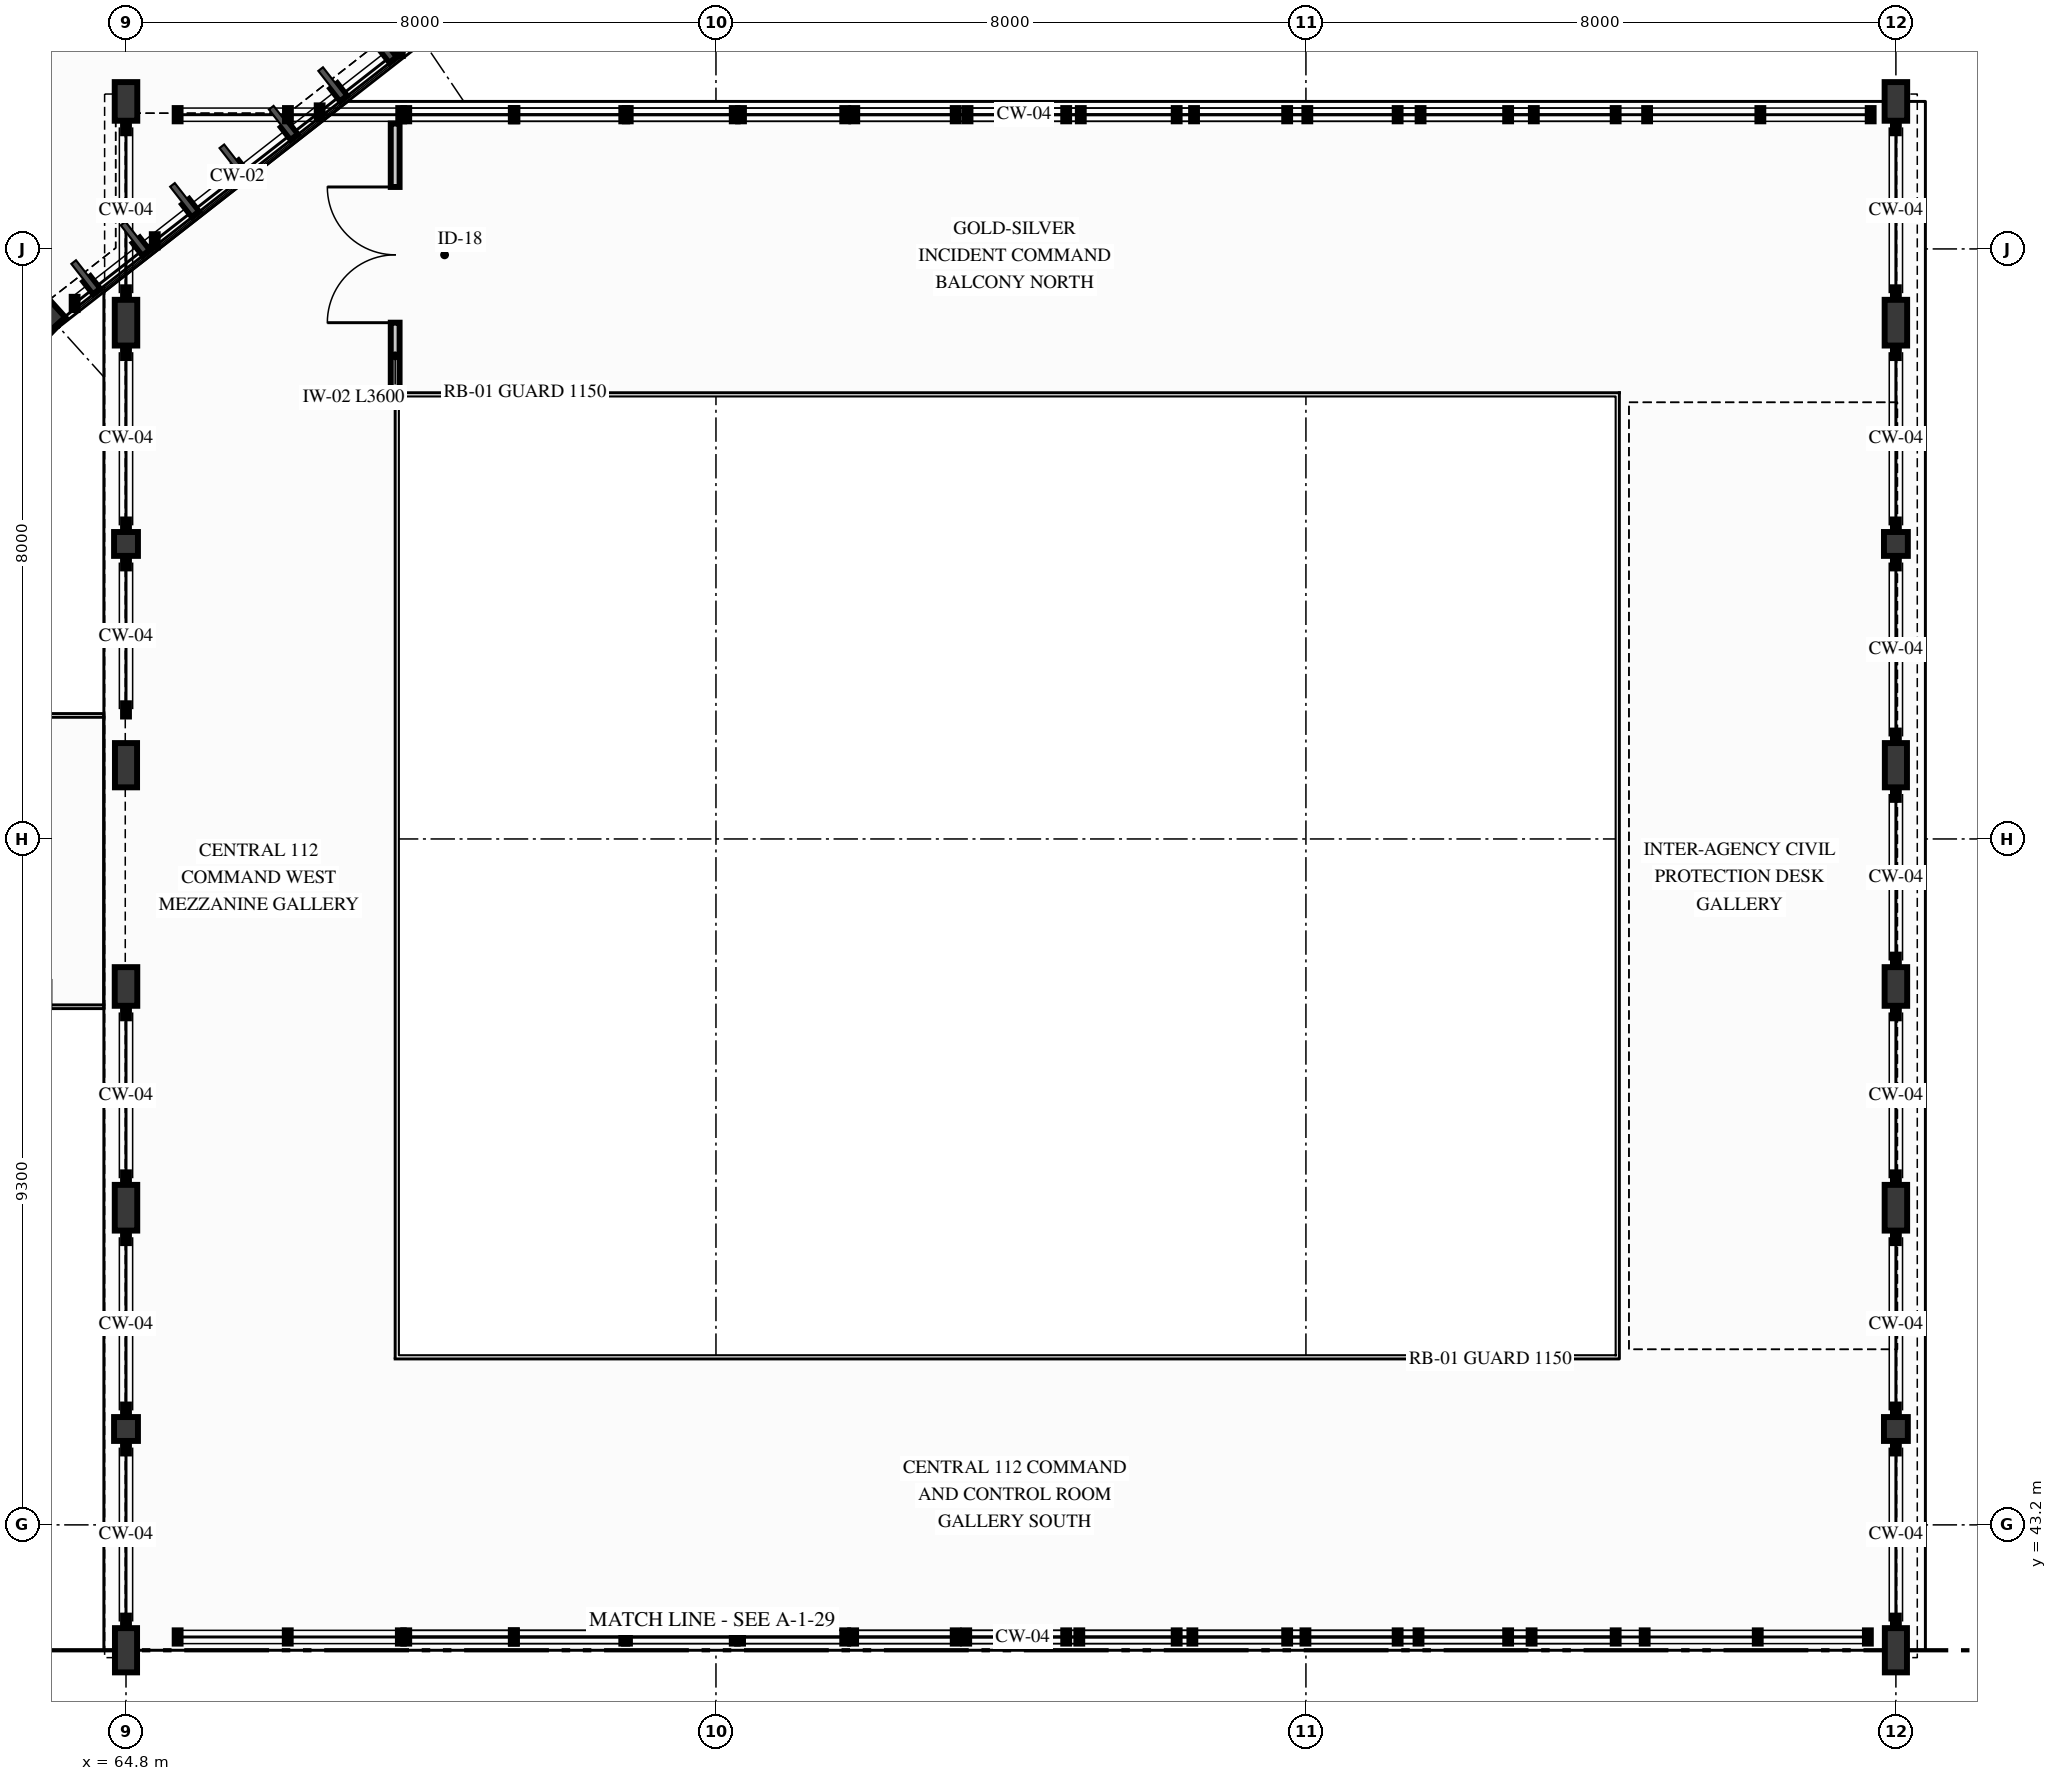
"""IFC4 building model, lengths in metres.
Left out: names, types, materials, properties, quantities, classifications, styles, units other than length and angle.
Written with IfcOpenShell. Run it as: python <this file> out.ifc"""

import sys

from ifc_helpers import new_model, si_unit, direction, frame, frame_2d, origin, origin_2d, place, context, subcontext, project, spatial, rectangle, hollow_circle, i_section, extrude, element, fill, save


model = new_model("IFC4")
c1 = context("Model", 3, precision=1e-05, world=origin(), true_north=direction((0.0, 1.0)))
c2 = subcontext(c1, "Body", "Model", "MODEL_VIEW")
j1 = project(units=[si_unit("LENGTHUNIT", "METRE"), si_unit("PLANEANGLEUNIT", "RADIAN")], contexts=[c1])
p1 = place(None, origin())
s1 = spatial("IfcSite", under=j1, at=p1, CompositionType="ELEMENT")
p2 = place(p1, origin())
s2 = spatial("IfcBuilding", under=s1, at=p2, CompositionType="ELEMENT")
p3 = place(p2, frame((0.0, 0.0, 5.1)))
s3 = spatial("IfcBuildingStorey", under=s2, at=p3, CompositionType="ELEMENT", Elevation=5.1)
p4 = place(p3, frame((63.655, 59.702, 0.0), z_axis=(0.0, 0.0, 1.0), x_axis=(0.743144825477, 0.669130606359, 0.0)))
e1 = element("IfcColumn", 1, at=p4, inside=s3, PredefinedType="COLUMN", context=c2, shape_type="SweptSolid", body=[
    extrude(i_section(OverallWidth=0.305, OverallDepth=0.62, WebThickness=0.021, FlangeThickness=0.04, FilletRadius=0.027, at=origin_2d()), origin(), (0.0, 0.0, 1.0), 4.2),
])
p5 = place(p3, frame((88.8, 41.5, 0.0), z_axis=(0.0, 0.0, 1.0), x_axis=(1.0, 0.0, 0.0)))
e2 = element("IfcColumn", 2, at=p5, inside=s3, PredefinedType="COLUMN", context=c2, shape_type="SweptSolid", body=[
    extrude(i_section(OverallWidth=0.3, OverallDepth=0.6, WebThickness=0.015, FlangeThickness=0.03, FilletRadius=0.027, at=origin_2d()), origin(), (0.0, 0.0, 1.0), 3.92),
])
p6 = place(p3, frame((88.8, 44.5, 0.0), z_axis=(0.0, 0.0, 1.0), x_axis=(1.0, 0.0, 0.0)))
e3 = element("IfcColumn", 3, at=p6, inside=s3, PredefinedType="COLUMN", context=c2, shape_type="SweptSolid", body=[
    extrude(hollow_circle(Radius=0.162, WallThickness=0.016, at=origin_2d()), origin(), (0.0, 0.0, 1.0), 3.92),
])
p7 = place(p3, frame((88.8, 47.5, 0.0), z_axis=(0.0, 0.0, 1.0), x_axis=(1.0, 0.0, 0.0)))
e4 = element("IfcColumn", 4, at=p7, inside=s3, PredefinedType="COLUMN", context=c2, shape_type="SweptSolid", body=[
    extrude(i_section(OverallWidth=0.305, OverallDepth=0.62, WebThickness=0.021, FlangeThickness=0.04, FilletRadius=0.027, at=origin_2d()), origin(), (0.0, 0.0, 1.0), 3.92),
])
p8 = place(p3, frame((88.8, 50.5, 0.0), z_axis=(0.0, 0.0, 1.0), x_axis=(1.0, 0.0, 0.0)))
e5 = element("IfcColumn", 5, at=p8, inside=s3, PredefinedType="COLUMN", context=c2, shape_type="SweptSolid", body=[
    extrude(i_section(OverallWidth=0.306, OverallDepth=0.524, WebThickness=0.021, FlangeThickness=0.04, FilletRadius=0.027, at=origin_2d()), origin(), (0.0, 0.0, 1.0), 3.92),
])
p9 = place(p3, frame((88.8, 53.5, 0.0), z_axis=(0.0, 0.0, 1.0), x_axis=(1.0, 0.0, 0.0)))
e6 = element("IfcColumn", 6, at=p9, inside=s3, PredefinedType="COLUMN", context=c2, shape_type="SweptSolid", body=[
    extrude(i_section(OverallWidth=0.3, OverallDepth=0.6, WebThickness=0.015, FlangeThickness=0.03, FilletRadius=0.027, at=origin_2d()), origin(), (0.0, 0.0, 1.0), 3.92),
])
p10 = place(p3, frame((88.8, 56.5, 0.0), z_axis=(0.0, 0.0, 1.0), x_axis=(1.0, 0.0, 0.0)))
e7 = element("IfcColumn", 7, at=p10, inside=s3, PredefinedType="COLUMN", context=c2, shape_type="SweptSolid", body=[
    extrude(hollow_circle(Radius=0.162, WallThickness=0.016, at=origin_2d()), origin(), (0.0, 0.0, 1.0), 3.92),
])
p11 = place(p3, frame((88.8, 59.5, 0.0), z_axis=(0.0, 0.0, 1.0), x_axis=(1.0, 0.0, 0.0)))
e8 = element("IfcColumn", 8, at=p11, inside=s3, PredefinedType="COLUMN", context=c2, shape_type="SweptSolid", body=[
    extrude(i_section(OverallWidth=0.305, OverallDepth=0.62, WebThickness=0.021, FlangeThickness=0.04, FilletRadius=0.027, at=origin_2d()), origin(), (0.0, 0.0, 1.0), 3.92),
])
p12 = place(p3, frame((88.8, 62.5, 0.0), z_axis=(0.0, 0.0, 1.0), x_axis=(1.0, 0.0, 0.0)))
e9 = element("IfcColumn", 9, at=p12, inside=s3, PredefinedType="COLUMN", context=c2, shape_type="SweptSolid", body=[
    extrude(i_section(OverallWidth=0.306, OverallDepth=0.524, WebThickness=0.021, FlangeThickness=0.04, FilletRadius=0.027, at=origin_2d()), origin(), (0.0, 0.0, 1.0), 3.92),
])
p13 = place(p3, frame((64.8, 41.5, 0.0), z_axis=(0.0, 0.0, 1.0), x_axis=(1.0, 0.0, 0.0)))
e10 = element("IfcColumn", 10, at=p13, inside=s3, PredefinedType="COLUMN", context=c2, shape_type="SweptSolid", body=[
    extrude(i_section(OverallWidth=0.3, OverallDepth=0.6, WebThickness=0.015, FlangeThickness=0.03, FilletRadius=0.027, at=origin_2d()), origin(), (0.0, 0.0, 1.0), 3.92),
])
p14 = place(p3, frame((64.8, 44.5, 0.0), z_axis=(0.0, 0.0, 1.0), x_axis=(1.0, 0.0, 0.0)))
e11 = element("IfcColumn", 11, at=p14, inside=s3, PredefinedType="COLUMN", context=c2, shape_type="SweptSolid", body=[
    extrude(hollow_circle(Radius=0.162, WallThickness=0.016, at=origin_2d()), origin(), (0.0, 0.0, 1.0), 3.92),
])
p15 = place(p3, frame((64.8, 47.5, 0.0), z_axis=(0.0, 0.0, 1.0), x_axis=(1.0, 0.0, 0.0)))
e12 = element("IfcColumn", 12, at=p15, inside=s3, PredefinedType="COLUMN", context=c2, shape_type="SweptSolid", body=[
    extrude(i_section(OverallWidth=0.305, OverallDepth=0.62, WebThickness=0.021, FlangeThickness=0.04, FilletRadius=0.027, at=origin_2d()), origin(), (0.0, 0.0, 1.0), 3.92),
])
p16 = place(p3, frame((64.8, 50.5, 0.0), z_axis=(0.0, 0.0, 1.0), x_axis=(1.0, 0.0, 0.0)))
e13 = element("IfcColumn", 13, at=p16, inside=s3, PredefinedType="COLUMN", context=c2, shape_type="SweptSolid", body=[
    extrude(i_section(OverallWidth=0.306, OverallDepth=0.524, WebThickness=0.021, FlangeThickness=0.04, FilletRadius=0.027, at=origin_2d()), origin(), (0.0, 0.0, 1.0), 3.92),
])
p17 = place(p3, frame((64.8, 53.5, 0.0), z_axis=(0.0, 0.0, 1.0), x_axis=(1.0, 0.0, 0.0)))
e14 = element("IfcColumn", 14, at=p17, inside=s3, PredefinedType="COLUMN", context=c2, shape_type="SweptSolid", body=[
    extrude(i_section(OverallWidth=0.3, OverallDepth=0.6, WebThickness=0.015, FlangeThickness=0.03, FilletRadius=0.027, at=origin_2d()), origin(), (0.0, 0.0, 1.0), 3.92),
])
p18 = place(p3, frame((64.8, 56.5, 0.0), z_axis=(0.0, 0.0, 1.0), x_axis=(1.0, 0.0, 0.0)))
e15 = element("IfcColumn", 15, at=p18, inside=s3, PredefinedType="COLUMN", context=c2, shape_type="SweptSolid", body=[
    extrude(hollow_circle(Radius=0.162, WallThickness=0.016, at=origin_2d()), origin(), (0.0, 0.0, 1.0), 3.92),
])
p19 = place(p3, frame((64.8, 59.5, 0.0), z_axis=(0.0, 0.0, 1.0), x_axis=(1.0, 0.0, 0.0)))
e16 = element("IfcColumn", 16, at=p19, inside=s3, PredefinedType="COLUMN", context=c2, shape_type="SweptSolid", body=[
    extrude(i_section(OverallWidth=0.305, OverallDepth=0.62, WebThickness=0.021, FlangeThickness=0.04, FilletRadius=0.027, at=origin_2d()), origin(), (0.0, 0.0, 1.0), 3.92),
])
p20 = place(p3, frame((64.8, 62.5, 0.0), z_axis=(0.0, 0.0, 1.0), x_axis=(1.0, 0.0, 0.0)))
e17 = element("IfcColumn", 17, at=p20, inside=s3, PredefinedType="COLUMN", context=c2, shape_type="SweptSolid", body=[
    extrude(i_section(OverallWidth=0.306, OverallDepth=0.524, WebThickness=0.021, FlangeThickness=0.04, FilletRadius=0.027, at=origin_2d()), origin(), (0.0, 0.0, 1.0), 3.92),
])
p21 = place(p3, frame((68.45, 58.6, 0.0), z_axis=(0.0, 0.0, 1.0), x_axis=(0.0, 1.0, 0.0)))
e18 = element("IfcWall", 18, at=p21, inside=s3, PredefinedType="PARTITIONING", context=c2, shape_type="SweptSolid", body=[
    extrude(rectangle(XDim=3.6, YDim=0.12, at=frame_2d((1.8, 0.0))), origin(), (0.0, 0.0, 1.0), 3.92),
])
p22 = place(p21, frame((0.9, 0.0, 0.0)))
e19 = element("IfcOpeningElement", 19, at=p22, cuts=e18, PredefinedType="OPENING", context=c2, shape_type="SweptSolid", body=[
    extrude(rectangle(XDim=1.84, YDim=2.38, at=frame_2d((0.92, 1.19))), frame((0.0, 0.07, 0.0), z_axis=(0.0, -1.0, 0.0), x_axis=(1.0, 0.0, 0.0)), (0.0, 0.0, 1.0), 0.14),
])
p23 = place(p22, origin())
e20 = element("IfcDoor", 20, at=p23, inside=s3, OperationType="DOUBLE_DOOR_SINGLE_SWING", PredefinedType="DOOR", context=c2, shape_type="SweptSolid", body=[
    extrude(rectangle(XDim=1.84, YDim=2.38, at=frame_2d((0.92, 1.19))), frame((0.0, 0.025, 0.0), z_axis=(0.0, -1.0, 0.0), x_axis=(1.0, 0.0, 0.0)), (0.0, 0.0, 1.0), 0.05),
])
fill(e19, e20)
save(model, sys.argv[1])
